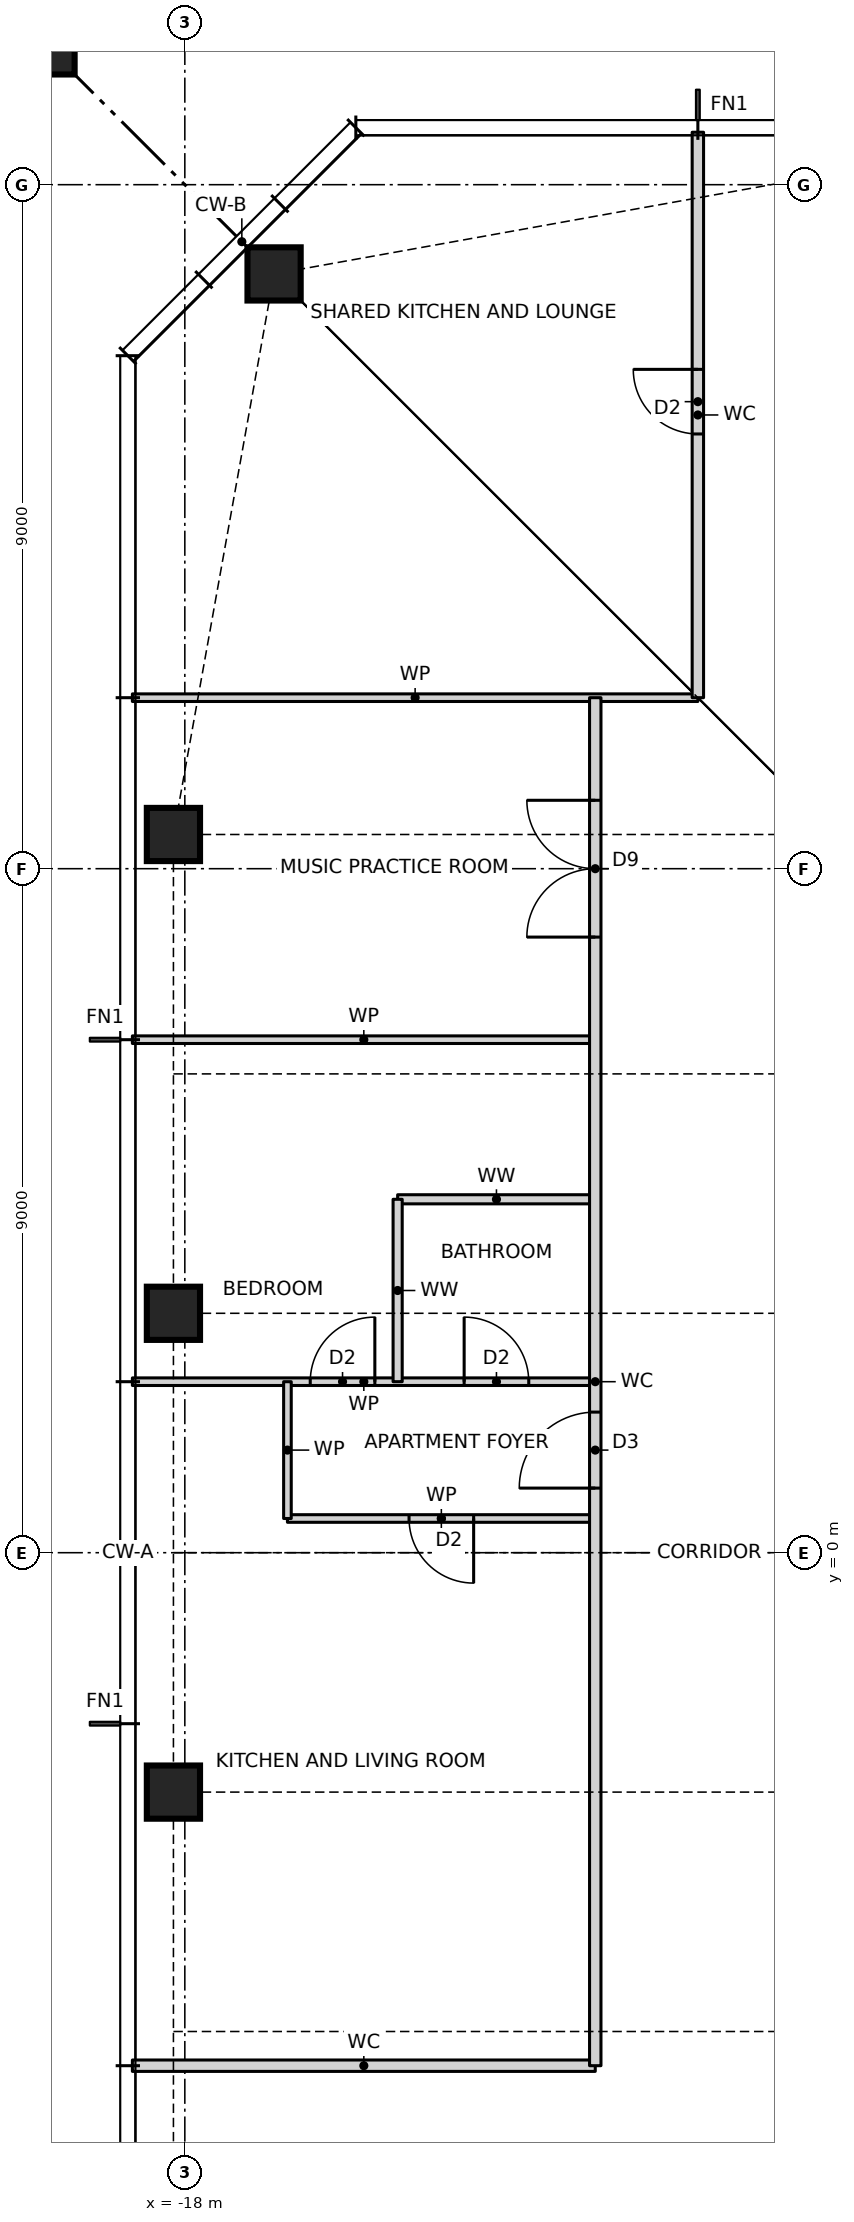
"""IFC4 building model, lengths in metres.
Left out: names, types, materials, properties, quantities, classifications, styles, units other than length and angle.
Written with IfcOpenShell. Run it as: python <this file> out.ifc"""

import sys

from ifc_helpers import new_model, si_unit, direction, frame, frame_2d, origin, origin_2d, place, context, subcontext, project, spatial, rectangle, hollow_rectangle, i_section, extrude, element, fill, save


model = new_model("IFC4")
c1 = context("Model", 3, precision=1e-05, world=origin(), true_north=direction((0.0, 1.0)))
c2 = subcontext(c1, "Body", "Model", "MODEL_VIEW")
j1 = project(units=[si_unit("LENGTHUNIT", "METRE"), si_unit("PLANEANGLEUNIT", "RADIAN")], contexts=[c1])
p1 = place(None, origin())
s1 = spatial("IfcSite", under=j1, at=p1, CompositionType="ELEMENT")
p2 = place(p1, origin())
s2 = spatial("IfcBuilding", under=s1, at=p2, CompositionType="ELEMENT")
p3 = place(p2, frame((0.0, 0.0, 184.5)))
s3 = spatial("IfcBuildingStorey", under=s2, at=p3, CompositionType="ELEMENT", Elevation=184.5)
for number, where, z_axis, x_axis in (
    (1, (-16.826, 16.826, 0.0), (0.0, 0.0, 1.0), (1.0, 0.0, 0.0)),
    (2, (-18.15, 9.45, 0.0), (0.0, 0.0, 1.0), (1.0, 0.0, 0.0)),
    (3, (-18.15, 3.15, 0.0), (0.0, 0.0, 1.0), (1.0, 0.0, 0.0)),
    (4, (-18.15, -3.15, 0.0), (0.0, 0.0, 1.0), (1.0, 0.0, 0.0)),
):
    element("IfcColumn", number, at=place(p3, frame(where, z_axis=z_axis, x_axis=x_axis)), inside=s3, PredefinedType="COLUMN", context=c2, shape_type="SweptSolid", body=[
        extrude(hollow_rectangle(XDim=0.7, YDim=0.7, WallThickness=0.06, at=origin_2d()), origin(), (0.0, 0.0, 1.0), 3.5),
    ])
p4 = place(p3, frame((-21.65, 21.65, 0.0), z_axis=(0.0, 0.0, 1.0), x_axis=(1.0, 0.0, 0.0)))
e5 = element("IfcColumn", 5, at=p4, inside=s3, PredefinedType="COLUMN", context=c2, shape_type="SweptSolid", body=[
    extrude(rectangle(XDim=4.4, YDim=4.4, at=origin_2d()), origin(), (0.0, 0.0, 1.0), 3.5),
    extrude(i_section(OverallWidth=0.478, OverallDepth=0.599, WebThickness=0.1, FlangeThickness=0.14, at=origin_2d()), origin(), (0.0, 0.0, 1.0), 3.5),
])
p5 = place(p3, frame((-18.69, -6.75, 0.0), z_axis=(0.0, 0.0, 1.0), x_axis=(1.0, 0.0, 0.0)))
e6 = element("IfcWall", 6, at=p5, inside=s3, PredefinedType="PARTITIONING", context=c2, shape_type="SweptSolid", body=[
    extrude(rectangle(XDim=6.09, YDim=0.15, at=frame_2d((3.045, 0.0))), origin(), (0.0, 0.0, 1.0), 3.27),
])
p6 = place(p3, frame((-16.65, 0.45, 0.0), z_axis=(0.0, 0.0, 1.0), x_axis=(1.0, 0.0, 0.0)))
e7 = element("IfcWall", 7, at=p6, inside=s3, PredefinedType="PARTITIONING", context=c2, shape_type="SweptSolid", body=[
    extrude(rectangle(XDim=4.05, YDim=0.1, at=frame_2d((2.025, 0.0))), origin(), (0.0, 0.0, 1.0), 3.27),
])
p7 = place(p6, frame((1.6, 0.0, 0.0)))
e8 = element("IfcOpeningElement", 8, at=p7, cuts=e7, PredefinedType="OPENING", context=c2, shape_type="SweptSolid", body=[
    extrude(rectangle(XDim=0.85, YDim=2.1, at=frame_2d((0.425, 1.05))), frame((0.0, 0.06, 0.0), z_axis=(0.0, -1.0, 0.0), x_axis=(1.0, 0.0, 0.0)), (0.0, 0.0, 1.0), 0.12),
])
p8 = place(p3, frame((-18.69, 2.25, 0.0), z_axis=(0.0, 0.0, 1.0), x_axis=(1.0, 0.0, 0.0)))
e9 = element("IfcWall", 9, at=p8, inside=s3, PredefinedType="PARTITIONING", context=c2, shape_type="SweptSolid", body=[
    extrude(rectangle(XDim=6.09, YDim=0.1, at=frame_2d((3.045, 0.0))), origin(), (0.0, 0.0, 1.0), 3.27),
])
p9 = place(p8, frame((2.34, 0.0, 0.0)))
e10 = element("IfcOpeningElement", 10, at=p9, cuts=e9, PredefinedType="OPENING", context=c2, shape_type="SweptSolid", body=[
    extrude(rectangle(XDim=0.85, YDim=2.1, at=frame_2d((0.425, 1.05))), frame((0.0, 0.06, 0.0), z_axis=(0.0, -1.0, 0.0), x_axis=(1.0, 0.0, 0.0)), (0.0, 0.0, 1.0), 0.12),
])
p10 = place(p8, frame((4.365, 0.0, 0.0)))
e11 = element("IfcOpeningElement", 11, at=p10, cuts=e9, PredefinedType="OPENING", context=c2, shape_type="SweptSolid", body=[
    extrude(rectangle(XDim=0.85, YDim=2.1, at=frame_2d((0.425, 1.05))), frame((0.0, 0.06, 0.0), z_axis=(0.0, -1.0, 0.0), x_axis=(1.0, 0.0, 0.0)), (0.0, 0.0, 1.0), 0.12),
])
p11 = place(p3, frame((-15.2, 4.65, 0.0), z_axis=(0.0, 0.0, 1.0), x_axis=(1.0, 0.0, 0.0)))
e12 = element("IfcWall", 12, at=p11, inside=s3, PredefinedType="PARTITIONING", context=c2, shape_type="SweptSolid", body=[
    extrude(rectangle(XDim=2.6, YDim=0.12, at=frame_2d((1.3, 0.0))), origin(), (0.0, 0.0, 1.0), 3.27),
])
p12 = place(p3, frame((-18.69, 6.75, 0.0), z_axis=(0.0, 0.0, 1.0), x_axis=(1.0, 0.0, 0.0)))
e13 = element("IfcWall", 13, at=p12, inside=s3, PredefinedType="PARTITIONING", context=c2, shape_type="SweptSolid", body=[
    extrude(rectangle(XDim=6.09, YDim=0.1, at=frame_2d((3.045, 0.0))), origin(), (0.0, 0.0, 1.0), 3.27),
])
p13 = place(p3, frame((-18.69, 11.25, 0.0), z_axis=(0.0, 0.0, 1.0), x_axis=(1.0, 0.0, 0.0)))
e14 = element("IfcWall", 14, at=p13, inside=s3, PredefinedType="PARTITIONING", context=c2, shape_type="SweptSolid", body=[
    extrude(rectangle(XDim=7.44, YDim=0.1, at=frame_2d((3.72, 0.0))), origin(), (0.0, 0.0, 1.0), 3.27),
])
p14 = place(p3, frame((-11.25, 11.25, 0.0), z_axis=(0.0, 0.0, 1.0), x_axis=(0.0, 1.0, 0.0)))
e15 = element("IfcWall", 15, at=p14, inside=s3, PredefinedType="PARTITIONING", context=c2, shape_type="SweptSolid", body=[
    extrude(rectangle(XDim=7.44, YDim=0.15, at=frame_2d((3.72, 0.0))), origin(), (0.0, 0.0, 1.0), 3.27),
])
p15 = place(p14, frame((3.47, 0.0, 0.0)))
e16 = element("IfcOpeningElement", 16, at=p15, cuts=e15, PredefinedType="OPENING", context=c2, shape_type="SweptSolid", body=[
    extrude(rectangle(XDim=0.85, YDim=2.1, at=frame_2d((0.425, 1.05))), frame((0.0, 0.085, 0.0), z_axis=(0.0, -1.0, 0.0), x_axis=(1.0, 0.0, 0.0)), (0.0, 0.0, 1.0), 0.17),
])
p16 = place(p3, frame((-12.6, -6.75, 0.0), z_axis=(0.0, 0.0, 1.0), x_axis=(0.0, 1.0, 0.0)))
e17 = element("IfcWall", 17, at=p16, inside=s3, PredefinedType="PARTITIONING", context=c2, shape_type="SweptSolid", body=[
    extrude(rectangle(XDim=18.0, YDim=0.15, at=frame_2d((9.0, 0.0))), origin(), (0.0, 0.0, 1.0), 3.27),
])
p17 = place(p16, frame((14.85, 0.0, 0.0)))
e18 = element("IfcOpeningElement", 18, at=p17, cuts=e17, PredefinedType="OPENING", context=c2, shape_type="SweptSolid", body=[
    extrude(rectangle(XDim=1.8, YDim=2.1, at=frame_2d((0.9, 1.05))), frame((0.0, 0.085, 0.0), z_axis=(0.0, -1.0, 0.0), x_axis=(1.0, 0.0, 0.0)), (0.0, 0.0, 1.0), 0.17),
])
p18 = place(p16, frame((7.6, 0.0, 0.0)))
e19 = element("IfcOpeningElement", 19, at=p18, cuts=e17, PredefinedType="OPENING", context=c2, shape_type="SweptSolid", body=[
    extrude(rectangle(XDim=1.0, YDim=2.1, at=frame_2d((0.5, 1.05))), frame((0.0, 0.085, 0.0), z_axis=(0.0, -1.0, 0.0), x_axis=(1.0, 0.0, 0.0)), (0.0, 0.0, 1.0), 0.17),
])
p19 = place(p3, frame((-15.2, 2.25, 0.0), z_axis=(0.0, 0.0, 1.0), x_axis=(0.0, 1.0, 0.0)))
e20 = element("IfcWall", 20, at=p19, inside=s3, PredefinedType="PARTITIONING", context=c2, shape_type="SweptSolid", body=[
    extrude(rectangle(XDim=2.4, YDim=0.12, at=frame_2d((1.2, 0.0))), origin(), (0.0, 0.0, 1.0), 3.27),
])
p20 = place(p3, frame((-16.65, 0.45, 0.0), z_axis=(0.0, 0.0, 1.0), x_axis=(0.0, 1.0, 0.0)))
e21 = element("IfcWall", 21, at=p20, inside=s3, PredefinedType="PARTITIONING", context=c2, shape_type="SweptSolid", body=[
    extrude(rectangle(XDim=1.8, YDim=0.1, at=frame_2d((0.9, 0.0))), origin(), (0.0, 0.0, 1.0), 3.27),
])
p21 = place(p17, origin())
e22 = element("IfcDoor", 22, at=p21, inside=s3, OperationType="DOUBLE_DOOR_SINGLE_SWING", PredefinedType="DOOR", context=c2, shape_type="SweptSolid", body=[
    extrude(rectangle(XDim=1.8, YDim=2.1, at=frame_2d((0.9, 1.05))), frame((0.0, 0.025, 0.0), z_axis=(0.0, -1.0, 0.0), x_axis=(1.0, 0.0, 0.0)), (0.0, 0.0, 1.0), 0.05),
])
fill(e18, e22)
p22 = place(p18, origin())
e23 = element("IfcDoor", 23, at=p22, inside=s3, OperationType="SINGLE_SWING_LEFT", PredefinedType="DOOR", context=c2, shape_type="SweptSolid", body=[
    extrude(rectangle(XDim=1.0, YDim=2.1, at=frame_2d((0.5, 1.05))), frame((0.0, 0.025, 0.0), z_axis=(0.0, -1.0, 0.0), x_axis=(1.0, 0.0, 0.0)), (0.0, 0.0, 1.0), 0.05),
])
fill(e19, e23)
p23 = place(p7, frame((0.85, 0.0, 0.0), z_axis=(0.0, 0.0, 1.0), x_axis=(-1.0, 0.0, 0.0)))
e24 = element("IfcDoor", 24, at=p23, inside=s3, OperationType="SINGLE_SWING_LEFT", PredefinedType="DOOR", context=c2, shape_type="SweptSolid", body=[
    extrude(rectangle(XDim=0.85, YDim=2.1, at=frame_2d((0.425, 1.05))), frame((0.0, 0.025, 0.0), z_axis=(0.0, -1.0, 0.0), x_axis=(1.0, 0.0, 0.0)), (0.0, 0.0, 1.0), 0.05),
])
fill(e8, e24)
p24 = place(p9, origin())
e25 = element("IfcDoor", 25, at=p24, inside=s3, OperationType="SINGLE_SWING_RIGHT", PredefinedType="DOOR", context=c2, shape_type="SweptSolid", body=[
    extrude(rectangle(XDim=0.85, YDim=2.1, at=frame_2d((0.425, 1.05))), frame((0.0, 0.025, 0.0), z_axis=(0.0, -1.0, 0.0), x_axis=(1.0, 0.0, 0.0)), (0.0, 0.0, 1.0), 0.05),
])
fill(e10, e25)
p25 = place(p10, origin())
e26 = element("IfcDoor", 26, at=p25, inside=s3, OperationType="SINGLE_SWING_LEFT", PredefinedType="DOOR", context=c2, shape_type="SweptSolid", body=[
    extrude(rectangle(XDim=0.85, YDim=2.1, at=frame_2d((0.425, 1.05))), frame((0.0, 0.025, 0.0), z_axis=(0.0, -1.0, 0.0), x_axis=(1.0, 0.0, 0.0)), (0.0, 0.0, 1.0), 0.05),
])
fill(e11, e26)
p26 = place(p15, origin())
e27 = element("IfcDoor", 27, at=p26, inside=s3, OperationType="SINGLE_SWING_RIGHT", PredefinedType="DOOR", context=c2, shape_type="SweptSolid", body=[
    extrude(rectangle(XDim=0.85, YDim=2.1, at=frame_2d((0.425, 1.05))), frame((0.0, 0.025, 0.0), z_axis=(0.0, -1.0, 0.0), x_axis=(1.0, 0.0, 0.0)), (0.0, 0.0, 1.0), 0.05),
])
fill(e16, e27)
save(model, sys.argv[1])
